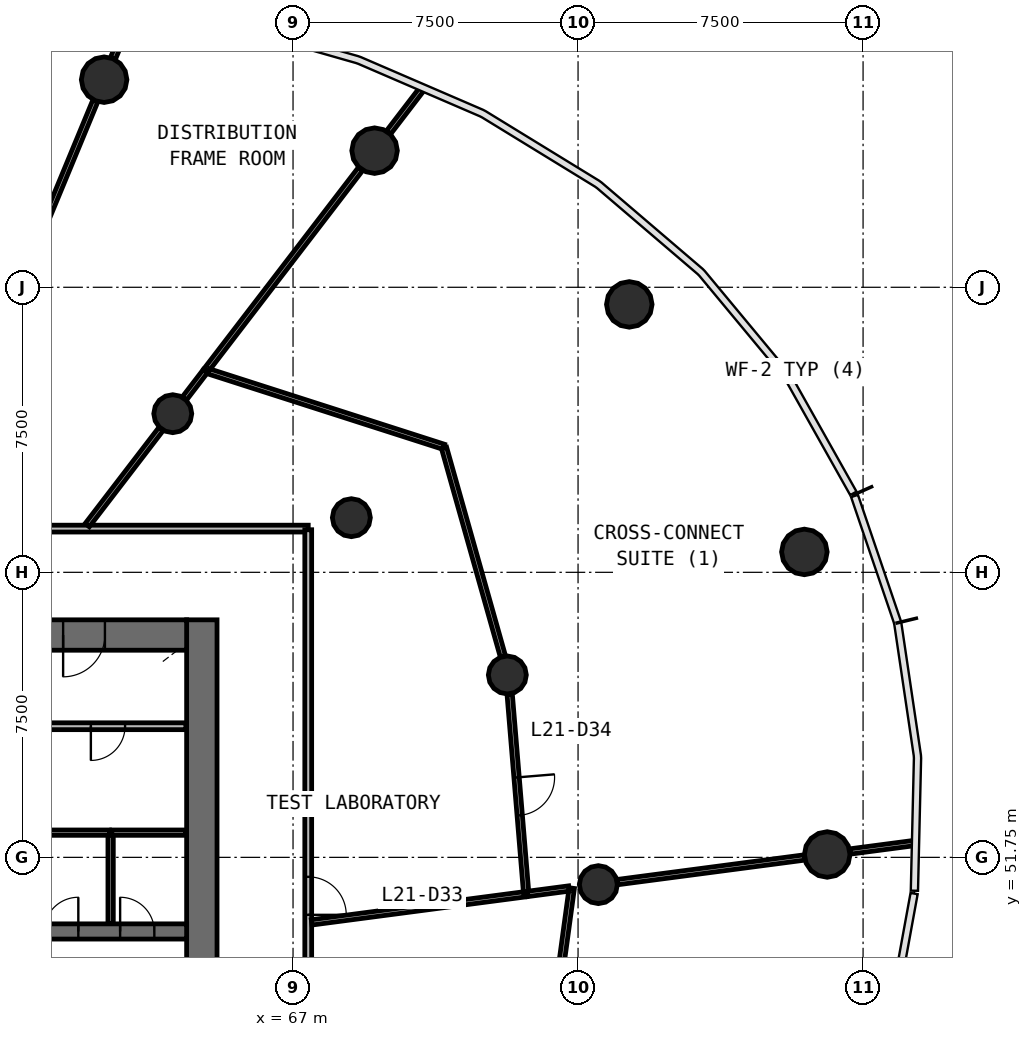
"""IFC4 building model, lengths in metres.
Left out: names, types, materials, properties, quantities, classifications, styles, units other than length and angle.
Written with IfcOpenShell. Run it as: python <this file> out.ifc"""

import sys

from ifc_helpers import new_model, si_unit, direction, frame, frame_2d, origin, origin_2d, place, context, subcontext, project, spatial, rectangle, circle, extrude, source, transform, mapped, element, fill, save


model = new_model("IFC4")
c1 = context("Model", 3, precision=1e-05, world=origin(), true_north=direction((0.0, 1.0)))
c2 = subcontext(c1, "Body", "Model", "MODEL_VIEW")
j1 = project(units=[si_unit("LENGTHUNIT", "METRE"), si_unit("PLANEANGLEUNIT", "RADIAN")], contexts=[c1])
p1 = place(None, origin())
s1 = spatial("IfcSite", under=j1, at=p1, CompositionType="ELEMENT")
p2 = place(p1, origin())
s2 = spatial("IfcBuilding", under=s1, at=p2, CompositionType="ELEMENT")
p3 = place(p2, frame((0.0, 0.0, 92.1)))
s3 = spatial("IfcBuildingStorey", under=s2, at=p3, CompositionType="ELEMENT", Elevation=92.1)
p4 = place(p3, frame((64.6, 38.0, 0.0), z_axis=(0.0, 0.0, 1.0), x_axis=(0.0, 1.0, 0.0)))
e1 = element("IfcWall", 1, at=p4, inside=s3, PredefinedType="SHEAR", context=c2, shape_type="SweptSolid", body=[
    extrude(rectangle(XDim=20.0, YDim=0.8, at=frame_2d((10.0, 0.0))), origin(), (0.0, 0.0, 1.0), 4.1),
])
p5 = place(p4, frame((9.1, 0.0, 0.0)))
e2 = element("IfcOpeningElement", 2, at=p5, cuts=e1, PredefinedType="OPENING", context=c2, shape_type="SweptSolid", body=[
    extrude(rectangle(XDim=1.8, YDim=2.1, at=frame_2d((0.9, 1.05))), frame((0.0, 0.41, 0.0), z_axis=(0.0, -1.0, 0.0), x_axis=(1.0, 0.0, 0.0)), (0.0, 0.0, 1.0), 0.82),
])
p6 = place(p3, frame((64.2, 57.6, 0.0), z_axis=(0.0, 0.0, 1.0), x_axis=(-1.0, 0.0, 0.0)))
e3 = element("IfcWall", 3, at=p6, inside=s3, PredefinedType="SHEAR", context=c2, shape_type="SweptSolid", body=[
    extrude(rectangle(XDim=24.4, YDim=0.8, at=frame_2d((12.2, 0.0))), origin(), (0.0, 0.0, 1.0), 4.1),
])
p7 = place(p6, frame((21.65, 0.0, 0.0)))
e4 = element("IfcOpeningElement", 4, at=p7, cuts=e3, PredefinedType="OPENING", context=c2, shape_type="SweptSolid", body=[
    extrude(rectangle(XDim=1.1, YDim=2.1, at=frame_2d((0.55, 1.05))), frame((0.0, 0.41, 0.0), z_axis=(0.0, -1.0, 0.0), x_axis=(1.0, 0.0, 0.0)), (0.0, 0.0, 1.0), 0.82),
])
p8 = place(p6, frame((2.15, 0.0, 0.0)))
e5 = element("IfcOpeningElement", 5, at=p8, cuts=e3, PredefinedType="OPENING", context=c2, shape_type="SweptSolid", body=[
    extrude(rectangle(XDim=1.1, YDim=2.1, at=frame_2d((0.55, 1.05))), frame((0.0, 0.41, 0.0), z_axis=(0.0, -1.0, 0.0), x_axis=(1.0, 0.0, 0.0)), (0.0, 0.0, 1.0), 0.82),
])
p9 = place(p3, frame((39.8, 49.8, 0.0), z_axis=(0.0, 0.0, 1.0), x_axis=(1.0, 0.0, 0.0)))
e6 = element("IfcWall", 6, at=p9, inside=s3, PredefinedType="SHEAR", context=c2, shape_type="SweptSolid", body=[
    extrude(rectangle(XDim=24.4, YDim=0.4, at=frame_2d((12.2, 0.0))), origin(), (0.0, 0.0, 1.0), 4.1),
])
p10 = place(p9, frame((4.7, 0.0, 0.0)))
e7 = element("IfcOpeningElement", 7, at=p10, cuts=e6, PredefinedType="OPENING", context=c2, shape_type="SweptSolid", body=[
    extrude(rectangle(XDim=1.1, YDim=2.1, at=frame_2d((0.55, 1.05))), frame((0.0, 0.21, 0.0), z_axis=(0.0, -1.0, 0.0), x_axis=(1.0, 0.0, 0.0)), (0.0, 0.0, 1.0), 0.42),
])
p11 = place(p9, frame((7.2, 0.0, 0.0)))
e8 = element("IfcOpeningElement", 8, at=p11, cuts=e6, PredefinedType="OPENING", context=c2, shape_type="SweptSolid", body=[
    extrude(rectangle(XDim=1.1, YDim=2.1, at=frame_2d((0.55, 1.05))), frame((0.0, 0.21, 0.0), z_axis=(0.0, -1.0, 0.0), x_axis=(1.0, 0.0, 0.0)), (0.0, 0.0, 1.0), 0.42),
])
p12 = place(p9, frame((9.7, 0.0, 0.0)))
e9 = element("IfcOpeningElement", 9, at=p12, cuts=e6, PredefinedType="OPENING", context=c2, shape_type="SweptSolid", body=[
    extrude(rectangle(XDim=1.1, YDim=2.1, at=frame_2d((0.55, 1.05))), frame((0.0, 0.21, 0.0), z_axis=(0.0, -1.0, 0.0), x_axis=(1.0, 0.0, 0.0)), (0.0, 0.0, 1.0), 0.42),
])
p13 = place(p9, frame((1.1, 0.0, 0.0)))
e10 = element("IfcOpeningElement", 10, at=p13, cuts=e6, PredefinedType="OPENING", context=c2, shape_type="SweptSolid", body=[
    extrude(rectangle(XDim=1.8, YDim=2.4, at=frame_2d((0.9, 1.2))), frame((0.0, 0.21, 0.0), z_axis=(0.0, -1.0, 0.0), x_axis=(1.0, 0.0, 0.0)), (0.0, 0.0, 1.0), 0.42),
])
p14 = place(p9, frame((20.65, 0.0, 0.0)))
e11 = element("IfcOpeningElement", 11, at=p14, cuts=e6, PredefinedType="OPENING", context=c2, shape_type="SweptSolid", body=[
    extrude(rectangle(XDim=0.9, YDim=2.1, at=frame_2d((0.45, 1.05))), frame((0.0, 0.21, 0.0), z_axis=(0.0, -1.0, 0.0), x_axis=(1.0, 0.0, 0.0)), (0.0, 0.0, 1.0), 0.42),
])
p15 = place(p9, frame((22.65, 0.0, 0.0)))
e12 = element("IfcOpeningElement", 12, at=p15, cuts=e6, PredefinedType="OPENING", context=c2, shape_type="SweptSolid", body=[
    extrude(rectangle(XDim=0.9, YDim=2.1, at=frame_2d((0.45, 1.05))), frame((0.0, 0.21, 0.0), z_axis=(0.0, -1.0, 0.0), x_axis=(1.0, 0.0, 0.0)), (0.0, 0.0, 1.0), 0.42),
])
p16 = place(p9, frame((11.85, 0.0, 0.0)))
e13 = element("IfcOpeningElement", 13, at=p16, cuts=e6, PredefinedType="OPENING", context=c2, shape_type="SweptSolid", body=[
    extrude(rectangle(XDim=0.9, YDim=2.1, at=frame_2d((0.45, 1.05))), frame((0.0, 0.21, 0.0), z_axis=(0.0, -1.0, 0.0), x_axis=(1.0, 0.0, 0.0)), (0.0, 0.0, 1.0), 0.42),
])
m1 = source(origin(), c2, "Body", "SweptSolid", [
    extrude(circle(Radius=0.6, at=origin_2d()), origin(), (0.0, 0.0, 1.0), 4.1),
])
for number, where, z_axis, x_axis in (
    (14, (81.056, 51.825, 0.0), (0.0, 0.0, 1.0), (1.0, 0.0, 0.0)),
    (15, (80.456, 59.787, 0.0), (0.0, 0.0, 1.0), (1.0, 0.0, 0.0)),
    (16, (75.848, 66.299, 0.0), (0.0, 0.0, 1.0), (1.0, 0.0, 0.0)),
    (17, (69.146, 70.345, 0.0), (0.0, 0.0, 1.0), (1.0, 0.0, 0.0)),
    (18, (62.029, 72.212, 0.0), (0.0, 0.0, 1.0), (1.0, 0.0, 0.0)),
):
    element("IfcColumn", number, at=place(p3, frame(where, z_axis=z_axis, x_axis=x_axis)), inside=s3, PredefinedType="COLUMN", context=c2, shape_type="MappedRepresentation", body=[
        mapped(m1, transform((0.0, 0.0, 0.0), scale=1.0)),
    ])
m2 = source(origin(), c2, "Body", "SweptSolid", [
    extrude(circle(Radius=0.5, at=origin_2d()), origin(), (0.0, 0.0, 1.0), 4.1),
])
for number, where, z_axis, x_axis in (
    (19, (75.034, 51.032, 0.0), (0.0, 0.0, 1.0), (1.0, 0.0, 0.0)),
    (20, (72.639, 56.549, 0.0), (0.0, 0.0, 1.0), (1.0, 0.0, 0.0)),
    (21, (68.535, 60.688, 0.0), (0.0, 0.0, 1.0), (1.0, 0.0, 0.0)),
    (22, (63.835, 63.424, 0.0), (0.0, 0.0, 1.0), (1.0, 0.0, 0.0)),
):
    element("IfcColumn", number, at=place(p3, frame(where, z_axis=z_axis, x_axis=x_axis)), inside=s3, PredefinedType="COLUMN", context=c2, shape_type="MappedRepresentation", body=[
        mapped(m2, transform((0.0, 0.0, 0.0), scale=1.0)),
    ])
p17 = place(p3, frame((36.6, 60.4, 0.0), z_axis=(0.0, 0.0, 1.0), x_axis=(1.0, 0.0, 0.0)))
e23 = element("IfcWall", 23, at=p17, inside=s3, PredefinedType="PARTITIONING", context=c2, shape_type="SweptSolid", body=[
    extrude(rectangle(XDim=30.8, YDim=0.18, at=frame_2d((15.4, 0.0))), origin(), (0.0, 0.0, 1.0), 2.9),
])
p18 = place(p17, frame((20.95, 0.0, 0.0)))
e24 = element("IfcOpeningElement", 24, at=p18, cuts=e23, PredefinedType="OPENING", context=c2, shape_type="SweptSolid", body=[
    extrude(rectangle(XDim=1.0, YDim=2.1, at=frame_2d((0.5, 1.05))), frame((0.0, 0.1, 0.0), z_axis=(0.0, -1.0, 0.0), x_axis=(1.0, 0.0, 0.0)), (0.0, 0.0, 1.0), 0.2),
])
p19 = place(p17, frame((14.95, 0.0, 0.0)))
e25 = element("IfcOpeningElement", 25, at=p19, cuts=e23, PredefinedType="OPENING", context=c2, shape_type="SweptSolid", body=[
    extrude(rectangle(XDim=1.0, YDim=2.1, at=frame_2d((0.5, 1.05))), frame((0.0, 0.1, 0.0), z_axis=(0.0, -1.0, 0.0), x_axis=(1.0, 0.0, 0.0)), (0.0, 0.0, 1.0), 0.2),
])
p20 = place(p17, frame((12.55, 0.0, 0.0)))
e26 = element("IfcOpeningElement", 26, at=p20, cuts=e23, PredefinedType="OPENING", context=c2, shape_type="SweptSolid", body=[
    extrude(rectangle(XDim=1.0, YDim=2.1, at=frame_2d((0.5, 1.05))), frame((0.0, 0.1, 0.0), z_axis=(0.0, -1.0, 0.0), x_axis=(1.0, 0.0, 0.0)), (0.0, 0.0, 1.0), 0.2),
])
p21 = place(p3, frame((67.4, 60.37, 0.0), z_axis=(0.0, 0.0, 1.0), x_axis=(0.0, -1.0, 0.0)))
e27 = element("IfcWall", 27, at=p21, inside=s3, PredefinedType="PARTITIONING", context=c2, shape_type="SweptSolid", body=[
    extrude(rectangle(XDim=23.583, YDim=0.18, at=frame_2d((11.791, 0.0))), origin(), (0.0, 0.0, 1.0), 2.9),
])
p22 = place(p21, frame((11.333, 0.0, 0.0)))
e28 = element("IfcOpeningElement", 28, at=p22, cuts=e27, PredefinedType="OPENING", context=c2, shape_type="SweptSolid", body=[
    extrude(rectangle(XDim=1.0, YDim=2.1, at=frame_2d((0.5, 1.05))), frame((0.0, 0.1, 0.0), z_axis=(0.0, -1.0, 0.0), x_axis=(1.0, 0.0, 0.0)), (0.0, 0.0, 1.0), 0.2),
])
p23 = place(p21, frame((9.133, 0.0, 0.0)))
e29 = element("IfcOpeningElement", 29, at=p23, cuts=e27, PredefinedType="OPENING", context=c2, shape_type="SweptSolid", body=[
    extrude(rectangle(XDim=1.0, YDim=2.1, at=frame_2d((0.5, 1.05))), frame((0.0, 0.1, 0.0), z_axis=(0.0, -1.0, 0.0), x_axis=(1.0, 0.0, 0.0)), (0.0, 0.0, 1.0), 0.2),
])
p24 = place(p3, frame((64.18, 55.2, 0.0), z_axis=(0.0, 0.0, 1.0), x_axis=(-1.0, 0.0, 0.0)))
e30 = element("IfcWall", 30, at=p24, inside=s3, PredefinedType="PARTITIONING", context=c2, shape_type="SweptSolid", body=[
    extrude(rectangle(XDim=3.95, YDim=0.18, at=frame_2d((1.975, 0.0))), origin(), (0.0, 0.0, 1.0), 3.7),
])
p25 = place(p24, frame((1.6, 0.0, 0.0)))
e31 = element("IfcOpeningElement", 31, at=p25, cuts=e30, PredefinedType="OPENING", context=c2, shape_type="SweptSolid", body=[
    extrude(rectangle(XDim=0.9, YDim=2.1, at=frame_2d((0.45, 1.05))), frame((0.0, 0.1, 0.0), z_axis=(0.0, -1.0, 0.0), x_axis=(1.0, 0.0, 0.0)), (0.0, 0.0, 1.0), 0.2),
])
p26 = place(p3, frame((64.708, 64.561, 0.0), z_axis=(0.0, 0.0, 1.0), x_axis=(0.608727396298, 0.793379453349, 0.0)))
e32 = element("IfcWall", 32, at=p26, inside=s3, PredefinedType="PARTITIONING", context=c2, shape_type="SweptSolid", body=[
    extrude(rectangle(XDim=6.686, YDim=0.14, at=frame_2d((3.343, 0.0))), origin(), (0.0, 0.0, 1.0), 2.9),
])
p27 = place(p3, frame((59.248, 65.498, 0.0), z_axis=(0.0, 0.0, 1.0), x_axis=(0.382696989205, 0.923873916968, 0.0)))
e33 = element("IfcWall", 33, at=p27, inside=s3, PredefinedType="PARTITIONING", context=c2, shape_type="SweptSolid", body=[
    extrude(rectangle(XDim=6.663, YDim=0.14, at=frame_2d((3.332, 0.0))), origin(), (0.0, 0.0, 1.0), 2.9),
])
p28 = place(p3, frame((70.966, 62.553, 0.0), z_axis=(0.0, 0.0, 1.0), x_axis=(-0.952177784747, 0.305544540508, 0.0)))
e34 = element("IfcWall", 34, at=p28, inside=s3, PredefinedType="PARTITIONING", context=c2, shape_type="SweptSolid", body=[
    extrude(rectangle(XDim=6.498, YDim=0.14, at=frame_2d((3.249, 0.0))), origin(), (0.0, 0.0, 1.0), 2.9),
])
p29 = place(p3, frame((67.49, 50.039, 0.0), z_axis=(0.0, 0.0, 1.0), x_axis=(0.99144553959, 0.130521040556, 0.0)))
e35 = element("IfcWall", 35, at=p29, inside=s3, PredefinedType="PARTITIONING", context=c2, shape_type="SweptSolid", body=[
    extrude(rectangle(XDim=5.696, YDim=0.14, at=frame_2d((2.848, 0.0))), origin(), (0.0, 0.0, 1.0), 2.9),
])
p30 = place(p3, frame((72.522, 57.04, 0.0), z_axis=(0.0, 0.0, 1.0), x_axis=(-0.27165858213, 0.962393690106, 0.0)))
e36 = element("IfcWall", 36, at=p30, inside=s3, PredefinedType="PARTITIONING", context=c2, shape_type="SweptSolid", body=[
    extrude(rectangle(XDim=5.699, YDim=0.14, at=frame_2d((2.849, 0.0))), origin(), (0.0, 0.0, 1.0), 2.9),
])
p31 = place(p3, frame((74.334, 50.94, 0.0), z_axis=(0.0, 0.0, 1.0), x_axis=(-0.135203344836, -0.990817872036, 0.0)))
e37 = element("IfcWall", 37, at=p31, inside=s3, PredefinedType="PARTITIONING", context=c2, shape_type="SweptSolid", body=[
    extrude(rectangle(XDim=5.439, YDim=0.14, at=frame_2d((2.719, 0.0))), origin(), (0.0, 0.0, 1.0), 2.9),
])
p32 = place(p31, frame((2.189, 0.0, 0.0)))
e38 = element("IfcOpeningElement", 38, at=p32, cuts=e37, PredefinedType="OPENING", context=c2, shape_type="SweptSolid", body=[
    extrude(rectangle(XDim=1.0, YDim=2.1, at=frame_2d((0.5, 1.05))), frame((0.0, 0.08, 0.0), z_axis=(0.0, -1.0, 0.0), x_axis=(1.0, 0.0, 0.0)), (0.0, 0.0, 1.0), 0.16),
])
p33 = place(p3, frame((72.7, 56.048, 0.0), z_axis=(0.0, 0.0, 1.0), x_axis=(0.082672421763, -0.996576776109, 0.0)))
e39 = element("IfcWall", 39, at=p33, inside=s3, PredefinedType="PARTITIONING", context=c2, shape_type="SweptSolid", body=[
    extrude(rectangle(XDim=5.254, YDim=0.14, at=frame_2d((2.627, 0.0))), origin(), (0.0, 0.0, 1.0), 2.9),
])
p34 = place(p33, frame((2.204, 0.0, 0.0)))
e40 = element("IfcOpeningElement", 40, at=p34, cuts=e39, PredefinedType="OPENING", context=c2, shape_type="SweptSolid", body=[
    extrude(rectangle(XDim=1.0, YDim=2.1, at=frame_2d((0.5, 1.05))), frame((0.0, 0.08, 0.0), z_axis=(0.0, -1.0, 0.0), x_axis=(1.0, 0.0, 0.0)), (0.0, 0.0, 1.0), 0.16),
])
p35 = place(p3, frame((75.534, 51.098, 0.0), z_axis=(0.0, 0.0, 1.0), x_axis=(0.991443414541, 0.130537181533, 0.0)))
e41 = element("IfcWall", 41, at=p35, inside=s3, PredefinedType="PARTITIONING", context=c2, shape_type="SweptSolid", body=[
    extrude(rectangle(XDim=4.966, YDim=0.14, at=frame_2d((2.483, 0.0))), origin(), (0.0, 0.0, 1.0), 2.9),
])
p36 = place(p3, frame((61.584, 60.49, 0.0), z_axis=(0.0, 0.0, 1.0), x_axis=(0.60874605662, 0.793365135703, 0.0)))
e42 = element("IfcWall", 42, at=p36, inside=s3, PredefinedType="PARTITIONING", context=c2, shape_type="SweptSolid", body=[
    extrude(rectangle(XDim=3.194, YDim=0.14, at=frame_2d((1.597, 0.0))), origin(), (0.0, 0.0, 1.0), 2.9),
])
p37 = place(p3, frame((62.2, 50.01, 0.0), z_axis=(0.0, 0.0, 1.0), x_axis=(0.0, 1.0, 0.0)))
e43 = element("IfcWall", 43, at=p37, inside=s3, PredefinedType="PARTITIONING", context=c2, shape_type="SweptSolid", body=[
    extrude(rectangle(XDim=2.39, YDim=0.14, at=frame_2d((1.195, 0.0))), origin(), (0.0, 0.0, 1.0), 2.9),
])
p38 = place(p3, frame((62.17, 52.4, 0.0), z_axis=(0.0, 0.0, 1.0), x_axis=(-1.0, 0.0, 0.0)))
e44 = element("IfcWall", 44, at=p38, inside=s3, PredefinedType="PARTITIONING", context=c2, shape_type="SweptSolid", body=[
    extrude(rectangle(XDim=1.94, YDim=0.14, at=frame_2d((0.97, 0.0))), origin(), (0.0, 0.0, 1.0), 2.9),
])
p39 = place(p3, frame((64.18, 52.4, 0.0), z_axis=(0.0, 0.0, 1.0), x_axis=(-1.0, 0.0, 0.0)))
e45 = element("IfcWall", 45, at=p39, inside=s3, PredefinedType="PARTITIONING", context=c2, shape_type="SweptSolid", body=[
    extrude(rectangle(XDim=1.95, YDim=0.14, at=frame_2d((0.975, 0.0))), origin(), (0.0, 0.0, 1.0), 2.9),
])
p40 = place(p3, frame((81.656, 51.904, 0.0), z_axis=(0.0, 0.0, 1.0), x_axis=(0.991450373449, 0.130484317017, 0.0)))
e46 = element("IfcWall", 46, at=p40, inside=s3, PredefinedType="PARTITIONING", context=c2, shape_type="SweptSolid", body=[
    extrude(rectangle(XDim=1.695, YDim=0.14, at=frame_2d((0.848, 0.0))), origin(), (0.0, 0.0, 1.0), 2.9),
])
p41 = place(p3, frame((69.514, 70.824, 0.0), z_axis=(0.0, 0.0, 1.0), x_axis=(0.608818785139, 0.79330932609, 0.0)))
e47 = element("IfcWall", 47, at=p41, inside=s3, PredefinedType="PARTITIONING", context=c2, shape_type="SweptSolid", body=[
    extrude(rectangle(XDim=1.429, YDim=0.14, at=frame_2d((0.715, 0.0))), origin(), (0.0, 0.0, 1.0), 2.9),
])
p42 = place(p3, frame((62.26, 72.771, 0.0), z_axis=(0.0, 0.0, 1.0), x_axis=(0.382705825988, 0.923870256451, 0.0)))
e48 = element("IfcWall", 48, at=p42, inside=s3, PredefinedType="PARTITIONING", context=c2, shape_type="SweptSolid", body=[
    extrude(rectangle(XDim=1.38, YDim=0.14, at=frame_2d((0.69, 0.0))), origin(), (0.0, 0.0, 1.0), 2.9),
])
p43 = place(p3, frame((73.167, 50.787, 0.0), z_axis=(0.0, 0.0, 1.0), x_axis=(0.991440755943, 0.130557372273, 0.0)))
e49 = element("IfcWall", 49, at=p43, inside=s3, PredefinedType="PARTITIONING", context=c2, shape_type="SweptSolid", body=[
    extrude(rectangle(XDim=1.105, YDim=0.14, at=frame_2d((0.553, 0.0))), origin(), (0.0, 0.0, 1.0), 2.9),
])
p44 = place(p3, frame((64.142, 63.824, 0.0), z_axis=(0.0, 0.0, 1.0), x_axis=(0.608870455138, 0.793269669696, 0.0)))
e50 = element("IfcWall", 50, at=p44, inside=s3, PredefinedType="PARTITIONING", context=c2, shape_type="SweptSolid", body=[
    extrude(rectangle(XDim=0.899, YDim=0.14, at=frame_2d((0.449, 0.0))), origin(), (0.0, 0.0, 1.0), 2.9),
])
m3 = source(origin(), c2, "Body", "SweptSolid", [
    extrude(rectangle(XDim=1.1, YDim=2.1, at=frame_2d((0.55, 1.05))), frame((0.0, 0.025, 0.0), z_axis=(0.0, -1.0, 0.0), x_axis=(1.0, 0.0, 0.0)), (0.0, 0.0, 1.0), 0.05),
])
p45 = place(p8, origin())
e51 = element("IfcDoor", 51, at=p45, inside=s3, OperationType="SINGLE_SWING_RIGHT", PredefinedType="DOOR", context=c2, shape_type="MappedRepresentation", body=[
    mapped(m3, transform((0.0, 0.0, 0.0), scale=1.0)),
])
fill(e5, e51)
m4 = source(origin(), c2, "Body", "SweptSolid", [
    extrude(rectangle(XDim=1.0, YDim=2.1, at=frame_2d((0.5, 1.05))), frame((0.0, 0.025, 0.0), z_axis=(0.0, -1.0, 0.0), x_axis=(1.0, 0.0, 0.0)), (0.0, 0.0, 1.0), 0.05),
])
p46 = place(p23, origin())
e52 = element("IfcDoor", 52, at=p46, inside=s3, OperationType="SINGLE_SWING_RIGHT", PredefinedType="DOOR", context=c2, shape_type="MappedRepresentation", body=[
    mapped(m4, transform((0.0, 0.0, 0.0), scale=1.0)),
])
fill(e29, e52)
p47 = place(p34, origin())
e53 = element("IfcDoor", 53, at=p47, inside=s3, OperationType="SINGLE_SWING_LEFT", PredefinedType="DOOR", context=c2, shape_type="MappedRepresentation", body=[
    mapped(m4, transform((0.0, 0.0, 0.0), scale=1.0)),
])
fill(e40, e53)
m5 = source(origin(), c2, "Body", "SweptSolid", [
    extrude(rectangle(XDim=0.9, YDim=2.1, at=frame_2d((0.45, 1.05))), frame((0.0, 0.025, 0.0), z_axis=(0.0, -1.0, 0.0), x_axis=(1.0, 0.0, 0.0)), (0.0, 0.0, 1.0), 0.05),
])
p48 = place(p14, origin())
e54 = element("IfcDoor", 54, at=p48, inside=s3, OperationType="SINGLE_SWING_RIGHT", PredefinedType="DOOR", context=c2, shape_type="MappedRepresentation", body=[
    mapped(m5, transform((0.0, 0.0, 0.0), scale=1.0)),
])
fill(e11, e54)
p49 = place(p15, origin())
e55 = element("IfcDoor", 55, at=p49, inside=s3, OperationType="SINGLE_SWING_LEFT", PredefinedType="DOOR", context=c2, shape_type="MappedRepresentation", body=[
    mapped(m5, transform((0.0, 0.0, 0.0), scale=1.0)),
])
fill(e12, e55)
p50 = place(p25, origin())
e56 = element("IfcDoor", 56, at=p50, inside=s3, OperationType="SINGLE_SWING_RIGHT", PredefinedType="DOOR", context=c2, shape_type="MappedRepresentation", body=[
    mapped(m5, transform((0.0, 0.0, 0.0), scale=1.0)),
])
fill(e31, e56)
save(model, sys.argv[1])
